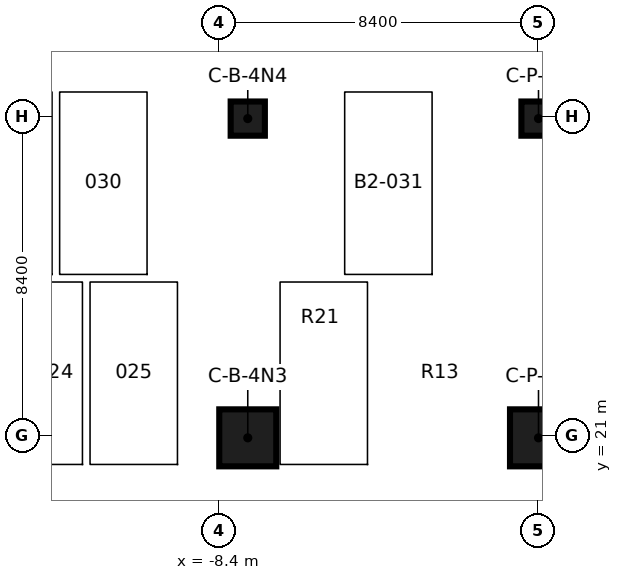
"""IFC4 building model, lengths in metres.
Left out: names, types, materials, properties, quantities, classifications, styles, units other than length and angle.
Written with IfcOpenShell. Run it as: python <this file> out.ifc"""

import sys

from ifc_helpers import new_model, si_unit, direction, frame, origin, origin_2d, place, context, subcontext, project, spatial, rectangle, extrude, element, save


model = new_model("IFC4")
c1 = context("Model", 3, precision=1e-05, world=origin(), true_north=direction((0.0, 1.0)))
c2 = subcontext(c1, "Body", "Model", "MODEL_VIEW")
j1 = project(units=[si_unit("LENGTHUNIT", "METRE"), si_unit("PLANEANGLEUNIT", "RADIAN")], contexts=[c1])
p1 = place(None, origin())
s1 = spatial("IfcSite", under=j1, at=p1, CompositionType="ELEMENT")
p2 = place(p1, origin())
s2 = spatial("IfcBuilding", under=s1, at=p2, CompositionType="ELEMENT")
p3 = place(p2, frame((0.0, 0.0, -9.0)))
s3 = spatial("IfcBuildingStorey", under=s2, at=p3, CompositionType="ELEMENT", Elevation=-9.0)
p4 = place(p3, frame((-7.65, 21.0, 0.0), z_axis=(0.0, 0.0, 1.0), x_axis=(1.0, 0.0, 0.0)))
e1 = element("IfcColumn", 1, at=p4, inside=s3, PredefinedType="COLUMN", context=c2, shape_type="SweptSolid", body=[
    extrude(rectangle(XDim=1.5, YDim=1.5, at=origin_2d()), origin(), (0.0, 0.0, 1.0), 3.7),
])
p5 = place(p3, frame((-7.65, 29.4, 0.0), z_axis=(0.0, 0.0, 1.0), x_axis=(1.0, 0.0, 0.0)))
e2 = element("IfcColumn", 2, at=p5, inside=s3, PredefinedType="COLUMN", context=c2, shape_type="SweptSolid", body=[
    extrude(rectangle(XDim=0.9, YDim=0.9, at=origin_2d()), origin(), (0.0, 0.0, 1.0), 3.7),
])
p6 = place(p3, frame((0.0, 21.0, 0.0), z_axis=(0.0, 0.0, 1.0), x_axis=(1.0, 0.0, 0.0)))
e3 = element("IfcColumn", 3, at=p6, inside=s3, PredefinedType="COLUMN", context=c2, shape_type="SweptSolid", body=[
    extrude(rectangle(XDim=1.5, YDim=1.5, at=origin_2d()), origin(), (0.0, 0.0, 1.0), 3.7),
])
p7 = place(p3, frame((0.0, 29.4, 0.0), z_axis=(0.0, 0.0, 1.0), x_axis=(1.0, 0.0, 0.0)))
e4 = element("IfcColumn", 4, at=p7, inside=s3, PredefinedType="COLUMN", context=c2, shape_type="SweptSolid", body=[
    extrude(rectangle(XDim=0.9, YDim=0.9, at=origin_2d()), origin(), (0.0, 0.0, 1.0), 3.7),
])
save(model, sys.argv[1])
